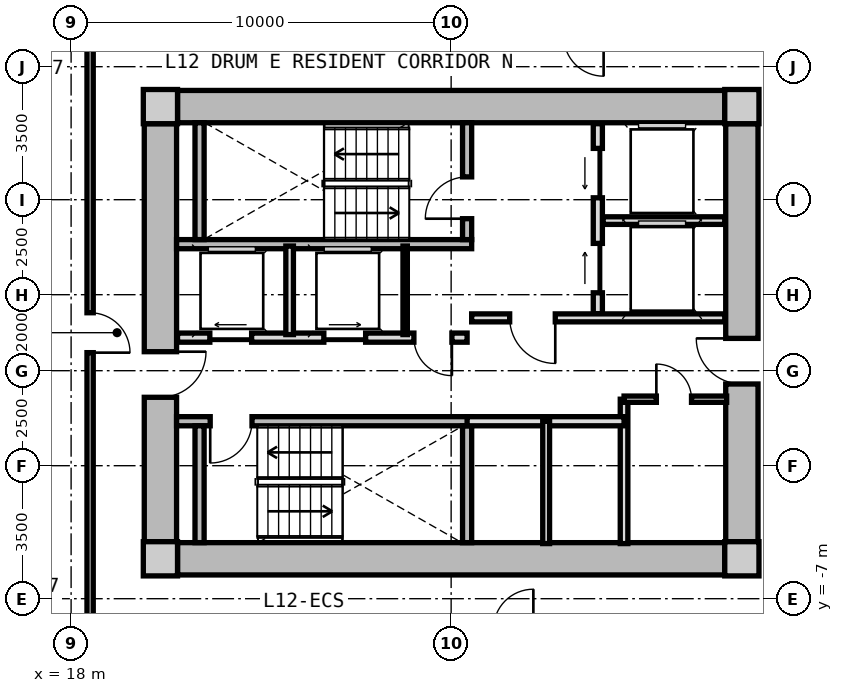
"""IFC4 building model, lengths in metres.
Left out: names, types, materials, properties, quantities, classifications, styles, units other than length and angle.
Written with IfcOpenShell. Run it as: python <this file> out.ifc"""

import sys

from ifc_helpers import new_model, si_unit, direction, frame, frame_2d, origin, origin_2d, place, context, subcontext, project, spatial, rectangle, extrude, source, transform, mapped, element, fill, save


model = new_model("IFC4")
c1 = context("Model", 3, precision=1e-05, world=origin(), true_north=direction((0.0, 1.0)))
c2 = subcontext(c1, "Body", "Model", "MODEL_VIEW")
j1 = project(units=[si_unit("LENGTHUNIT", "METRE"), si_unit("PLANEANGLEUNIT", "RADIAN")], contexts=[c1])
p1 = place(None, origin())
s1 = spatial("IfcSite", under=j1, at=p1, CompositionType="ELEMENT")
p2 = place(p1, origin())
s2 = spatial("IfcBuilding", under=s1, at=p2, CompositionType="ELEMENT")
p3 = place(p2, frame((0.0, 0.0, 42.95)))
s3 = spatial("IfcBuildingStorey", under=s2, at=p3, CompositionType="ELEMENT", Elevation=42.95)
m1 = source(origin(), c2, "Body", "SweptSolid", [
    extrude(rectangle(XDim=0.9, YDim=0.9, at=origin_2d()), origin(), (0.0, 0.0, 1.0), 3.05),
])
for number, where, z_axis, x_axis in (
    (1, (20.35, -5.95, 0.0), (0.0, 0.0, 1.0), (1.0, 0.0, 0.0)),
    (2, (35.65, -5.95, 0.0), (0.0, 0.0, 1.0), (1.0, 0.0, 0.0)),
    (3, (35.65, 5.95, 0.0), (0.0, 0.0, 1.0), (1.0, 0.0, 0.0)),
    (4, (20.35, 5.95, 0.0), (0.0, 0.0, 1.0), (1.0, 0.0, 0.0)),
):
    element("IfcColumn", number, at=place(p3, frame(where, z_axis=z_axis, x_axis=x_axis)), inside=s3, PredefinedType="COLUMN", context=c2, shape_type="MappedRepresentation", body=[
        mapped(m1, transform((0.0, 0.0, 0.0), x_axis=(1.0, 0.0, 0.0), y_axis=(0.0, 1.0, 0.0), z_axis=(0.0, 0.0, 1.0), scale=1.0)),
    ])
m2 = source(origin(), c2, "Body", "SweptSolid", [
    extrude(rectangle(XDim=14.4, YDim=0.85, at=frame_2d((7.2, 0.0))), origin(), (0.0, 0.0, 1.0), 2.79),
])
for number, where, z_axis, x_axis in (
    (5, (20.8, 5.95, 0.0), (0.0, 0.0, 1.0), (1.0, 0.0, 0.0)),
    (6, (35.2, -5.95, 0.0), (0.0, 0.0, 1.0), (-1.0, 0.0, 0.0)),
):
    element("IfcWall", number, at=place(p3, frame(where, z_axis=z_axis, x_axis=x_axis)), inside=s3, PredefinedType="SHEAR", context=c2, shape_type="MappedRepresentation", body=[
        mapped(m2, transform((0.0, 0.0, 0.0), x_axis=(1.0, 0.0, 0.0), y_axis=(0.0, 1.0, 0.0), z_axis=(0.0, 0.0, 1.0), scale=1.0)),
    ])
m3 = source(origin(), c2, "Body", "SweptSolid", [
    extrude(rectangle(XDim=11.0, YDim=0.85, at=frame_2d((5.5, 0.0))), origin(), (0.0, 0.0, 1.0), 2.79),
])
p4 = place(p3, frame((20.35, -5.5, 0.0), z_axis=(0.0, 0.0, 1.0), x_axis=(0.0, 1.0, 0.0)))
e7 = element("IfcWall", 7, at=p4, inside=s3, PredefinedType="SHEAR", context=c2, shape_type="MappedRepresentation", body=[
    mapped(m3, transform((0.0, 0.0, 0.0), x_axis=(1.0, 0.0, 0.0), y_axis=(0.0, 1.0, 0.0), z_axis=(0.0, 0.0, 1.0), scale=1.0)),
])
p5 = place(p4, frame((3.8, 0.0, 0.0)))
e8 = element("IfcOpeningElement", 8, at=p5, cuts=e7, PredefinedType="OPENING", context=c2, shape_type="SweptSolid", body=[
    extrude(rectangle(XDim=1.2, YDim=2.15, at=frame_2d((0.6, 1.075))), frame((0.0, 0.435, 0.0), z_axis=(0.0, -1.0, 0.0), x_axis=(1.0, 0.0, 0.0)), (0.0, 0.0, 1.0), 0.87),
])
p6 = place(p3, frame((35.65, 5.5, 0.0), z_axis=(0.0, 0.0, 1.0), x_axis=(0.0, -1.0, 0.0)))
e9 = element("IfcWall", 9, at=p6, inside=s3, PredefinedType="SHEAR", context=c2, shape_type="MappedRepresentation", body=[
    mapped(m3, transform((0.0, 0.0, 0.0), x_axis=(1.0, 0.0, 0.0), y_axis=(0.0, 1.0, 0.0), z_axis=(0.0, 0.0, 1.0), scale=1.0)),
])
p7 = place(p6, frame((5.65, 0.0, 0.0)))
e10 = element("IfcOpeningElement", 10, at=p7, cuts=e9, PredefinedType="OPENING", context=c2, shape_type="SweptSolid", body=[
    extrude(rectangle(XDim=1.2, YDim=2.15, at=frame_2d((0.6, 1.075))), frame((0.0, 0.435, 0.0), z_axis=(0.0, -1.0, 0.0), x_axis=(1.0, 0.0, 0.0)), (0.0, 0.0, 1.0), 0.87),
])
m4 = source(origin(), c2, "Body", "SweptSolid", [
    extrude(rectangle(XDim=7.765, YDim=0.24, at=frame_2d((3.883, 0.0))), origin(), (0.0, 0.0, 1.0), 2.79),
])
p8 = place(p3, frame((20.775, 2.33, 0.0), z_axis=(0.0, 0.0, 1.0), x_axis=(1.0, 0.0, 0.0)))
e11 = element("IfcWall", 11, at=p8, inside=s3, PredefinedType="PARTITIONING", context=c2, shape_type="MappedRepresentation", body=[
    mapped(m4, transform((0.0, 0.0, 0.0), x_axis=(1.0, 0.0, 0.0), y_axis=(0.0, 1.0, 0.0), z_axis=(0.0, 0.0, 1.0), scale=1.0)),
])
m5 = source(origin(), c2, "Body", "SweptSolid", [
    extrude(rectangle(XDim=3.075, YDim=0.24, at=frame_2d((1.538, 0.0))), origin(), (0.0, 0.0, 1.0), 2.79),
])
p9 = place(p3, frame((21.38, 2.45, 0.0), z_axis=(0.0, 0.0, 1.0), x_axis=(0.0, 1.0, 0.0)))
e12 = element("IfcWall", 12, at=p9, inside=s3, PredefinedType="PARTITIONING", context=c2, shape_type="MappedRepresentation", body=[
    mapped(m5, transform((0.0, 0.0, 0.0), x_axis=(1.0, 0.0, 0.0), y_axis=(0.0, 1.0, 0.0), z_axis=(0.0, 0.0, 1.0), scale=1.0)),
])
p10 = place(p3, frame((28.42, 2.45, 0.0), z_axis=(0.0, 0.0, 1.0), x_axis=(0.0, 1.0, 0.0)))
e13 = element("IfcWall", 13, at=p10, inside=s3, PredefinedType="PARTITIONING", context=c2, shape_type="MappedRepresentation", body=[
    mapped(m5, transform((0.0, 0.0, 0.0), x_axis=(1.0, 0.0, 0.0), y_axis=(0.0, 1.0, 0.0), z_axis=(0.0, 0.0, 1.0), scale=1.0)),
])
p11 = place(p10, frame((0.55, 0.0, 0.0)))
e14 = element("IfcOpeningElement", 14, at=p11, cuts=e13, PredefinedType="OPENING", context=c2, shape_type="SweptSolid", body=[
    extrude(rectangle(XDim=1.1, YDim=2.15, at=frame_2d((0.55, 1.075))), frame((0.0, 0.13, 0.0), z_axis=(0.0, -1.0, 0.0), x_axis=(1.0, 0.0, 0.0)), (0.0, 0.0, 1.0), 0.26),
])
p12 = place(p3, frame((20.775, -2.33, 0.0), z_axis=(0.0, 0.0, 1.0), x_axis=(1.0, 0.0, 0.0)))
e15 = element("IfcWall", 15, at=p12, inside=s3, PredefinedType="PARTITIONING", context=c2, shape_type="MappedRepresentation", body=[
    mapped(m4, transform((0.0, 0.0, 0.0), x_axis=(1.0, 0.0, 0.0), y_axis=(0.0, 1.0, 0.0), z_axis=(0.0, 0.0, 1.0), scale=1.0)),
])
p13 = place(p12, frame((0.885, 0.0, 0.0)))
e16 = element("IfcOpeningElement", 16, at=p13, cuts=e15, PredefinedType="OPENING", context=c2, shape_type="SweptSolid", body=[
    extrude(rectangle(XDim=1.1, YDim=2.15, at=frame_2d((0.55, 1.075))), frame((0.0, 0.13, 0.0), z_axis=(0.0, -1.0, 0.0), x_axis=(1.0, 0.0, 0.0)), (0.0, 0.0, 1.0), 0.26),
])
for number, where, z_axis, x_axis in (
    (17, (21.38, -5.525, 0.0), (0.0, 0.0, 1.0), (0.0, 1.0, 0.0)),
    (18, (28.42, -5.525, 0.0), (0.0, 0.0, 1.0), (0.0, 1.0, 0.0)),
):
    element("IfcWall", number, at=place(p3, frame(where, z_axis=z_axis, x_axis=x_axis)), inside=s3, PredefinedType="PARTITIONING", context=c2, shape_type="MappedRepresentation", body=[
        mapped(m5, transform((0.0, 0.0, 0.0), x_axis=(1.0, 0.0, 0.0), y_axis=(0.0, 1.0, 0.0), z_axis=(0.0, 0.0, 1.0), scale=1.0)),
    ])
m6 = source(origin(), c2, "Body", "SweptSolid", [
    extrude(rectangle(XDim=5.0, YDim=0.24, at=frame_2d((2.5, 0.0))), origin(), (0.0, 0.0, 1.0), 2.775),
])
p14 = place(p3, frame((31.86, 0.5, 0.0), z_axis=(0.0, 0.0, 1.0), x_axis=(0.0, 1.0, 0.0)))
e19 = element("IfcWall", 19, at=p14, inside=s3, PredefinedType="PARTITIONING", context=c2, shape_type="MappedRepresentation", body=[
    mapped(m6, transform((0.0, 0.0, 0.0), x_axis=(1.0, 0.0, 0.0), y_axis=(0.0, 1.0, 0.0), z_axis=(0.0, 0.0, 1.0), scale=1.0)),
])
p15 = place(p14, frame((3.05, 0.0, 0.0)))
e20 = element("IfcOpeningElement", 20, at=p15, cuts=e19, PredefinedType="OPENING", context=c2, shape_type="SweptSolid", body=[
    extrude(rectangle(XDim=1.3, YDim=2.2, at=frame_2d((0.65, 1.1))), frame((0.0, 0.13, 0.0), z_axis=(0.0, -1.0, 0.0), x_axis=(1.0, 0.0, 0.0)), (0.0, 0.0, 1.0), 0.26),
])
p16 = place(p14, frame((0.55, 0.0, 0.0)))
e21 = element("IfcOpeningElement", 21, at=p16, cuts=e19, PredefinedType="OPENING", context=c2, shape_type="SweptSolid", body=[
    extrude(rectangle(XDim=1.3, YDim=2.2, at=frame_2d((0.65, 1.1))), frame((0.0, 0.13, 0.0), z_axis=(0.0, -1.0, 0.0), x_axis=(1.0, 0.0, 0.0)), (0.0, 0.0, 1.0), 0.26),
])
m7 = source(origin(), c2, "Body", "SweptSolid", [
    extrude(rectangle(XDim=3.2, YDim=0.2, at=frame_2d((1.6, 0.0))), origin(), (0.0, 0.0, 1.0), 2.775),
])
p17 = place(p3, frame((32.0, 2.95, 0.0), z_axis=(0.0, 0.0, 1.0), x_axis=(1.0, 0.0, 0.0)))
e22 = element("IfcWall", 22, at=p17, inside=s3, PredefinedType="PARTITIONING", context=c2, shape_type="MappedRepresentation", body=[
    mapped(m7, transform((0.0, 0.0, 0.0), x_axis=(1.0, 0.0, 0.0), y_axis=(0.0, 1.0, 0.0), z_axis=(0.0, 0.0, 1.0), scale=1.0)),
])
m8 = source(origin(), c2, "Body", "SweptSolid", [
    extrude(rectangle(XDim=6.66, YDim=0.21, at=frame_2d((3.33, 0.0))), origin(), (0.0, 0.0, 1.0), 2.775),
])
p18 = place(p3, frame((28.54, 0.39, 0.0), z_axis=(0.0, 0.0, 1.0), x_axis=(1.0, 0.0, 0.0)))
e23 = element("IfcWall", 23, at=p18, inside=s3, PredefinedType="PARTITIONING", context=c2, shape_type="MappedRepresentation", body=[
    mapped(m8, transform((0.0, 0.0, 0.0), x_axis=(1.0, 0.0, 0.0), y_axis=(0.0, 1.0, 0.0), z_axis=(0.0, 0.0, 1.0), scale=1.0)),
])
p19 = place(p18, frame((1.0, 0.0, 0.0)))
e24 = element("IfcOpeningElement", 24, at=p19, cuts=e23, PredefinedType="OPENING", context=c2, shape_type="SweptSolid", body=[
    extrude(rectangle(XDim=1.2, YDim=2.15, at=frame_2d((0.6, 1.075))), frame((0.0, 0.115, 0.0), z_axis=(0.0, -1.0, 0.0), x_axis=(1.0, 0.0, 0.0)), (0.0, 0.0, 1.0), 0.23),
])
m9 = source(origin(), c2, "Body", "SweptSolid", [
    extrude(rectangle(XDim=7.62, YDim=0.24, at=frame_2d((3.81, 0.0))), origin(), (0.0, 0.0, 1.0), 2.775),
])
p20 = place(p3, frame((20.8, -0.13, 0.0), z_axis=(0.0, 0.0, 1.0), x_axis=(1.0, 0.0, 0.0)))
e25 = element("IfcWall", 25, at=p20, inside=s3, PredefinedType="PARTITIONING", context=c2, shape_type="MappedRepresentation", body=[
    mapped(m9, transform((0.0, 0.0, 0.0), x_axis=(1.0, 0.0, 0.0), y_axis=(0.0, 1.0, 0.0), z_axis=(0.0, 0.0, 1.0), scale=1.0)),
])
p21 = place(p20, frame((6.22, 0.0, 0.0)))
e26 = element("IfcOpeningElement", 26, at=p21, cuts=e25, PredefinedType="OPENING", context=c2, shape_type="SweptSolid", body=[
    extrude(rectangle(XDim=1.0, YDim=2.1, at=frame_2d((0.5, 1.05))), frame((0.0, 0.13, 0.0), z_axis=(0.0, -1.0, 0.0), x_axis=(1.0, 0.0, 0.0)), (0.0, 0.0, 1.0), 0.26),
])
p22 = place(p20, frame((0.85, 0.0, 0.0)))
e27 = element("IfcOpeningElement", 27, at=p22, cuts=e25, PredefinedType="OPENING", context=c2, shape_type="SweptSolid", body=[
    extrude(rectangle(XDim=1.1, YDim=2.2, at=frame_2d((0.55, 1.1))), frame((0.0, 0.13, 0.0), z_axis=(0.0, -1.0, 0.0), x_axis=(1.0, 0.0, 0.0)), (0.0, 0.0, 1.0), 0.26),
])
p23 = place(p20, frame((3.85, 0.0, 0.0)))
e28 = element("IfcOpeningElement", 28, at=p23, cuts=e25, PredefinedType="OPENING", context=c2, shape_type="SweptSolid", body=[
    extrude(rectangle(XDim=1.1, YDim=2.2, at=frame_2d((0.55, 1.1))), frame((0.0, 0.13, 0.0), z_axis=(0.0, -1.0, 0.0), x_axis=(1.0, 0.0, 0.0)), (0.0, 0.0, 1.0), 0.26),
])
m10 = source(origin(), c2, "Body", "SweptSolid", [
    extrude(rectangle(XDim=2.33, YDim=0.115, at=frame_2d((1.165, 0.0))), origin(), (0.0, 0.0, 1.0), 2.775),
])
p24 = place(p3, frame((26.79, -0.05, 0.0), z_axis=(0.0, 0.0, 1.0), x_axis=(0.0, 1.0, 0.0)))
e29 = element("IfcWall", 29, at=p24, inside=s3, PredefinedType="PARTITIONING", context=c2, shape_type="MappedRepresentation", body=[
    mapped(m10, transform((0.0, 0.0, 0.0), x_axis=(1.0, 0.0, 0.0), y_axis=(0.0, 1.0, 0.0), z_axis=(0.0, 0.0, 1.0), scale=1.0)),
])
m11 = source(origin(), c2, "Body", "SweptSolid", [
    extrude(rectangle(XDim=2.33, YDim=0.2, at=frame_2d((1.165, 0.0))), origin(), (0.0, 0.0, 1.0), 2.775),
])
p25 = place(p3, frame((23.75, -0.05, 0.0), z_axis=(0.0, 0.0, 1.0), x_axis=(0.0, 1.0, 0.0)))
e30 = element("IfcWall", 30, at=p25, inside=s3, PredefinedType="PARTITIONING", context=c2, shape_type="MappedRepresentation", body=[
    mapped(m11, transform((0.0, 0.0, 0.0), x_axis=(1.0, 0.0, 0.0), y_axis=(0.0, 1.0, 0.0), z_axis=(0.0, 0.0, 1.0), scale=1.0)),
])
m12 = source(origin(), c2, "Body", "SweptSolid", [
    extrude(rectangle(XDim=3.8, YDim=0.2, at=frame_2d((1.9, 0.0))), origin(), (0.0, 0.0, 1.0), 2.775),
])
p26 = place(p3, frame((32.55, -5.55, 0.0), z_axis=(0.0, 0.0, 1.0), x_axis=(0.0, 1.0, 0.0)))
e31 = element("IfcWall", 31, at=p26, inside=s3, PredefinedType="PARTITIONING", context=c2, shape_type="MappedRepresentation", body=[
    mapped(m12, transform((0.0, 0.0, 0.0), x_axis=(1.0, 0.0, 0.0), y_axis=(0.0, 1.0, 0.0), z_axis=(0.0, 0.0, 1.0), scale=1.0)),
])
m13 = source(origin(), c2, "Body", "SweptSolid", [
    extrude(rectangle(XDim=4.13, YDim=0.24, at=frame_2d((2.065, 0.0))), origin(), (0.0, 0.0, 1.0), 2.775),
])
p27 = place(p3, frame((28.42, -2.33, 0.0), z_axis=(0.0, 0.0, 1.0), x_axis=(1.0, 0.0, 0.0)))
e32 = element("IfcWall", 32, at=p27, inside=s3, PredefinedType="PARTITIONING", context=c2, shape_type="MappedRepresentation", body=[
    mapped(m13, transform((0.0, 0.0, 0.0), x_axis=(1.0, 0.0, 0.0), y_axis=(0.0, 1.0, 0.0), z_axis=(0.0, 0.0, 1.0), scale=1.0)),
])
m14 = source(origin(), c2, "Body", "SweptSolid", [
    extrude(rectangle(XDim=3.22, YDim=0.18, at=frame_2d((1.61, 0.0))), origin(), (0.0, 0.0, 1.0), 2.775),
])
p28 = place(p3, frame((30.5, -5.55, 0.0), z_axis=(0.0, 0.0, 1.0), x_axis=(0.0, 1.0, 0.0)))
e33 = element("IfcWall", 33, at=p28, inside=s3, PredefinedType="PARTITIONING", context=c2, shape_type="MappedRepresentation", body=[
    mapped(m14, transform((0.0, 0.0, 0.0), x_axis=(1.0, 0.0, 0.0), y_axis=(0.0, 1.0, 0.0), z_axis=(0.0, 0.0, 1.0), scale=1.0)),
])
m15 = source(origin(), c2, "Body", "SweptSolid", [
    extrude(rectangle(XDim=2.7, YDim=0.165, at=frame_2d((1.35, 0.0))), origin(), (0.0, 0.0, 1.0), 2.775),
])
p29 = place(p3, frame((32.55, -1.75, 0.0), z_axis=(0.0, 0.0, 1.0), x_axis=(1.0, 0.0, 0.0)))
e34 = element("IfcWall", 34, at=p29, inside=s3, PredefinedType="PARTITIONING", context=c2, shape_type="MappedRepresentation", body=[
    mapped(m15, transform((0.0, 0.0, 0.0), x_axis=(1.0, 0.0, 0.0), y_axis=(0.0, 1.0, 0.0), z_axis=(0.0, 0.0, 1.0), scale=1.0)),
])
p30 = place(p29, frame((0.85, 0.0, 0.0)))
e35 = element("IfcOpeningElement", 35, at=p30, cuts=e34, PredefinedType="OPENING", context=c2, shape_type="SweptSolid", body=[
    extrude(rectangle(XDim=0.925, YDim=2.1, at=frame_2d((0.462, 1.05))), frame((0.0, 0.093, 0.0), z_axis=(0.0, -1.0, 0.0), x_axis=(1.0, 0.0, 0.0)), (0.0, 0.0, 1.0), 0.185),
])
m16 = source(origin(), c2, "Body", "SweptSolid", [
    extrude(rectangle(XDim=15.6, YDim=0.165, at=frame_2d((7.8, 0.0))), origin(), (0.0, 0.0, 1.0), 2.775),
])
p31 = place(p3, frame((18.5, -7.8, 0.0), z_axis=(0.0, 0.0, 1.0), x_axis=(0.0, 1.0, 0.0)))
e36 = element("IfcWall", 36, at=p31, inside=s3, PredefinedType="PARTITIONING", context=c2, shape_type="MappedRepresentation", body=[
    mapped(m16, transform((0.0, 0.0, 0.0), x_axis=(1.0, 0.0, 0.0), y_axis=(0.0, 1.0, 0.0), z_axis=(0.0, 0.0, 1.0), scale=1.0)),
])
p32 = place(p31, frame((7.275, 0.0, 0.0)))
e37 = element("IfcOpeningElement", 37, at=p32, cuts=e36, PredefinedType="OPENING", context=c2, shape_type="SweptSolid", body=[
    extrude(rectangle(XDim=1.05, YDim=2.15, at=frame_2d((0.525, 1.075))), frame((0.0, 0.093, 0.0), z_axis=(0.0, -1.0, 0.0), x_axis=(1.0, 0.0, 0.0)), (0.0, 0.0, 1.0), 0.185),
])
m17 = source(origin(), c2, "Body", "SweptSolid", [
    extrude(rectangle(XDim=1.1, YDim=2.15, at=frame_2d((0.55, 1.075))), frame((0.0, 0.025, 0.0), z_axis=(0.0, -1.0, 0.0), x_axis=(1.0, 0.0, 0.0)), (0.0, 0.0, 1.0), 0.05),
])
p33 = place(p11, origin())
e38 = element("IfcDoor", 38, at=p33, inside=s3, OperationType="SINGLE_SWING_LEFT", PredefinedType="DOOR", context=c2, shape_type="MappedRepresentation", body=[
    mapped(m17, transform((0.0, 0.0, 0.0), x_axis=(1.0, 0.0, 0.0), y_axis=(0.0, 1.0, 0.0), z_axis=(0.0, 0.0, 1.0), scale=1.0)),
])
fill(e14, e38)
p34 = place(p13, frame((1.1, 0.0, 0.0), z_axis=(0.0, 0.0, 1.0), x_axis=(-1.0, 0.0, 0.0)))
e39 = element("IfcDoor", 39, at=p34, inside=s3, OperationType="SINGLE_SWING_RIGHT", PredefinedType="DOOR", context=c2, shape_type="MappedRepresentation", body=[
    mapped(m17, transform((0.0, 0.0, 0.0), x_axis=(1.0, 0.0, 0.0), y_axis=(0.0, 1.0, 0.0), z_axis=(0.0, 0.0, 1.0), scale=1.0)),
])
fill(e16, e39)
m18 = source(origin(), c2, "Body", "SweptSolid", [
    extrude(rectangle(XDim=1.3, YDim=2.2, at=frame_2d((0.65, 1.1))), frame((0.0, 0.025, 0.0), z_axis=(0.0, -1.0, 0.0), x_axis=(1.0, 0.0, 0.0)), (0.0, 0.0, 1.0), 0.05),
])
p35 = place(p15, origin())
e40 = element("IfcDoor", 40, at=p35, inside=s3, OperationType="SLIDING_TO_LEFT", PredefinedType="DOOR", context=c2, shape_type="MappedRepresentation", body=[
    mapped(m18, transform((0.0, 0.0, 0.0), x_axis=(1.0, 0.0, 0.0), y_axis=(0.0, 1.0, 0.0), z_axis=(0.0, 0.0, 1.0), scale=1.0)),
])
fill(e20, e40)
p36 = place(p16, origin())
e41 = element("IfcDoor", 41, at=p36, inside=s3, OperationType="SLIDING_TO_RIGHT", PredefinedType="DOOR", context=c2, shape_type="MappedRepresentation", body=[
    mapped(m18, transform((0.0, 0.0, 0.0), x_axis=(1.0, 0.0, 0.0), y_axis=(0.0, 1.0, 0.0), z_axis=(0.0, 0.0, 1.0), scale=1.0)),
])
fill(e21, e41)
m19 = source(origin(), c2, "Body", "SweptSolid", [
    extrude(rectangle(XDim=1.2, YDim=2.15, at=frame_2d((0.6, 1.075))), frame((0.0, 0.025, 0.0), z_axis=(0.0, -1.0, 0.0), x_axis=(1.0, 0.0, 0.0)), (0.0, 0.0, 1.0), 0.05),
])
p37 = place(p19, frame((1.2, 0.0, 0.0), z_axis=(0.0, 0.0, 1.0), x_axis=(-1.0, 0.0, 0.0)))
e42 = element("IfcDoor", 42, at=p37, inside=s3, OperationType="SINGLE_SWING_LEFT", PredefinedType="DOOR", context=c2, shape_type="MappedRepresentation", body=[
    mapped(m19, transform((0.0, 0.0, 0.0), x_axis=(1.0, 0.0, 0.0), y_axis=(0.0, 1.0, 0.0), z_axis=(0.0, 0.0, 1.0), scale=1.0)),
])
fill(e24, e42)
p38 = place(p5, frame((1.2, 0.0, 0.0), z_axis=(0.0, 0.0, 1.0), x_axis=(-1.0, 0.0, 0.0)))
e43 = element("IfcDoor", 43, at=p38, inside=s3, OperationType="SINGLE_SWING_LEFT", PredefinedType="DOOR", context=c2, shape_type="MappedRepresentation", body=[
    mapped(m19, transform((0.0, 0.0, 0.0), x_axis=(1.0, 0.0, 0.0), y_axis=(0.0, 1.0, 0.0), z_axis=(0.0, 0.0, 1.0), scale=1.0)),
])
fill(e8, e43)
p39 = place(p7, frame((1.2, 0.0, 0.0), z_axis=(0.0, 0.0, 1.0), x_axis=(-1.0, 0.0, 0.0)))
e44 = element("IfcDoor", 44, at=p39, inside=s3, OperationType="SINGLE_SWING_RIGHT", PredefinedType="DOOR", context=c2, shape_type="MappedRepresentation", body=[
    mapped(m19, transform((0.0, 0.0, 0.0), x_axis=(1.0, 0.0, 0.0), y_axis=(0.0, 1.0, 0.0), z_axis=(0.0, 0.0, 1.0), scale=1.0)),
])
fill(e10, e44)
m20 = source(origin(), c2, "Body", "SweptSolid", [
    extrude(rectangle(XDim=1.0, YDim=2.1, at=frame_2d((0.5, 1.05))), frame((0.0, 0.025, 0.0), z_axis=(0.0, -1.0, 0.0), x_axis=(1.0, 0.0, 0.0)), (0.0, 0.0, 1.0), 0.05),
])
p40 = place(p21, frame((1.0, 0.0, 0.0), z_axis=(0.0, 0.0, 1.0), x_axis=(-1.0, 0.0, 0.0)))
e45 = element("IfcDoor", 45, at=p40, inside=s3, OperationType="SINGLE_SWING_LEFT", PredefinedType="DOOR", context=c2, shape_type="MappedRepresentation", body=[
    mapped(m20, transform((0.0, 0.0, 0.0), x_axis=(1.0, 0.0, 0.0), y_axis=(0.0, 1.0, 0.0), z_axis=(0.0, 0.0, 1.0), scale=1.0)),
])
fill(e26, e45)
m21 = source(origin(), c2, "Body", "SweptSolid", [
    extrude(rectangle(XDim=1.1, YDim=2.2, at=frame_2d((0.55, 1.1))), frame((0.0, 0.025, 0.0), z_axis=(0.0, -1.0, 0.0), x_axis=(1.0, 0.0, 0.0)), (0.0, 0.0, 1.0), 0.05),
])
p41 = place(p22, origin())
e46 = element("IfcDoor", 46, at=p41, inside=s3, OperationType="SLIDING_TO_LEFT", PredefinedType="DOOR", context=c2, shape_type="MappedRepresentation", body=[
    mapped(m21, transform((0.0, 0.0, 0.0), x_axis=(1.0, 0.0, 0.0), y_axis=(0.0, 1.0, 0.0), z_axis=(0.0, 0.0, 1.0), scale=1.0)),
])
fill(e27, e46)
p42 = place(p23, origin())
e47 = element("IfcDoor", 47, at=p42, inside=s3, OperationType="SLIDING_TO_RIGHT", PredefinedType="DOOR", context=c2, shape_type="MappedRepresentation", body=[
    mapped(m21, transform((0.0, 0.0, 0.0), x_axis=(1.0, 0.0, 0.0), y_axis=(0.0, 1.0, 0.0), z_axis=(0.0, 0.0, 1.0), scale=1.0)),
])
fill(e28, e47)
m22 = source(origin(), c2, "Body", "SweptSolid", [
    extrude(rectangle(XDim=0.925, YDim=2.1, at=frame_2d((0.462, 1.05))), frame((0.0, 0.025, 0.0), z_axis=(0.0, -1.0, 0.0), x_axis=(1.0, 0.0, 0.0)), (0.0, 0.0, 1.0), 0.05),
])
p43 = place(p30, origin())
e48 = element("IfcDoor", 48, at=p43, inside=s3, OperationType="SINGLE_SWING_LEFT", PredefinedType="DOOR", context=c2, shape_type="MappedRepresentation", body=[
    mapped(m22, transform((0.0, 0.0, 0.0), x_axis=(1.0, 0.0, 0.0), y_axis=(0.0, 1.0, 0.0), z_axis=(0.0, 0.0, 1.0), scale=1.0)),
])
fill(e35, e48)
m23 = source(origin(), c2, "Body", "SweptSolid", [
    extrude(rectangle(XDim=1.05, YDim=2.15, at=frame_2d((0.525, 1.075))), frame((0.0, 0.025, 0.0), z_axis=(0.0, -1.0, 0.0), x_axis=(1.0, 0.0, 0.0)), (0.0, 0.0, 1.0), 0.05),
])
p44 = place(p32, frame((1.05, 0.0, 0.0), z_axis=(0.0, 0.0, 1.0), x_axis=(-1.0, 0.0, 0.0)))
e49 = element("IfcDoor", 49, at=p44, inside=s3, OperationType="SINGLE_SWING_RIGHT", PredefinedType="DOOR", context=c2, shape_type="MappedRepresentation", body=[
    mapped(m23, transform((0.0, 0.0, 0.0), x_axis=(1.0, 0.0, 0.0), y_axis=(0.0, 1.0, 0.0), z_axis=(0.0, 0.0, 1.0), scale=1.0)),
])
fill(e37, e49)
save(model, sys.argv[1])
